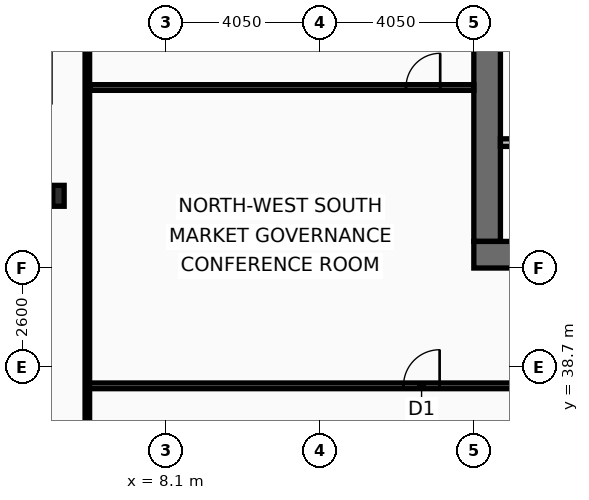
"""IFC4 building model, lengths in metres.
Left out: names, types, materials, properties, quantities, classifications, styles, units other than length and angle.
Written with IfcOpenShell. Run it as: python <this file> out.ifc"""

import sys

from ifc_helpers import new_model, si_unit, direction, frame, frame_2d, origin, origin_2d, place, context, subcontext, project, spatial, rectangle, i_section, extrude, element, fill, save


model = new_model("IFC4")
c1 = context("Model", 3, precision=1e-05, world=origin(), true_north=direction((0.0, 1.0)))
c2 = subcontext(c1, "Body", "Model", "MODEL_VIEW")
j1 = project(units=[si_unit("LENGTHUNIT", "METRE"), si_unit("PLANEANGLEUNIT", "RADIAN")], contexts=[c1])
p1 = place(None, origin())
s1 = spatial("IfcSite", under=j1, at=p1, CompositionType="ELEMENT")
p2 = place(p1, origin())
s2 = spatial("IfcBuilding", under=s1, at=p2, CompositionType="ELEMENT")
p3 = place(p2, frame((0.0, 0.0, 165.0)))
s3 = spatial("IfcBuildingStorey", under=s2, at=p3, CompositionType="ELEMENT", Elevation=165.0)
p4 = place(p3, frame((16.55, 42.0, 0.0), z_axis=(0.0, 0.0, 1.0), x_axis=(0.0, 1.0, 0.0)))
e1 = element("IfcWall", 1, at=p4, inside=s3, PredefinedType="SHEAR", context=c2, shape_type="SweptSolid", body=[
    extrude(rectangle(XDim=11.0, YDim=0.7, at=frame_2d((5.5, 0.0))), origin(), (0.0, 0.0, 1.0), 3.44),
])
p5 = place(p3, frame((18.65, 41.65, 0.0), z_axis=(0.0, 0.0, 1.0), x_axis=(-1.0, 0.0, 0.0)))
e2 = element("IfcWall", 2, at=p5, inside=s3, PredefinedType="SHEAR", context=c2, shape_type="SweptSolid", body=[
    extrude(rectangle(XDim=2.45, YDim=0.7, at=frame_2d((1.225, 0.0))), origin(), (0.0, 0.0, 1.0), 3.44),
])
p6 = place(p3, frame((5.27, 43.2, 0.0), z_axis=(0.0, 0.0, 1.0), x_axis=(1.0, 0.0, 0.0)))
e3 = element("IfcColumn", 3, at=p6, inside=s3, PredefinedType="COLUMN", context=c2, shape_type="SweptSolid", body=[
    extrude(i_section(OverallWidth=0.3, OverallDepth=0.55, WebThickness=0.015, FlangeThickness=0.029, at=origin_2d()), origin(), (0.0, 0.0, 1.0), 3.6),
])
p7 = place(p3, frame((16.9, 44.6, 0.0), z_axis=(0.0, 0.0, 1.0), x_axis=(1.0, 0.0, 0.0)))
e4 = element("IfcWall", 4, at=p7, inside=s3, PredefinedType="PARTITIONING", context=c2, shape_type="SweptSolid", body=[
    extrude(rectangle(XDim=4.1, YDim=0.2, at=frame_2d((2.05, 0.0))), origin(), (0.0, 0.0, 1.0), 3.44),
])
p8 = place(p7, frame((1.25, 0.0, 0.0)))
e5 = element("IfcOpeningElement", 5, at=p8, cuts=e4, PredefinedType="OPENING", context=c2, shape_type="SweptSolid", body=[
    extrude(rectangle(XDim=1.05, YDim=2.15, at=frame_2d((0.525, 1.075))), frame((0.0, 0.11, 0.0), z_axis=(0.0, -1.0, 0.0), x_axis=(1.0, 0.0, 0.0)), (0.0, 0.0, 1.0), 0.22),
])
p9 = place(p3, frame((6.03, 38.2, 0.0), z_axis=(0.0, 0.0, 1.0), x_axis=(1.0, 0.0, 0.0)))
e6 = element("IfcWall", 6, at=p9, inside=s3, PredefinedType="PARTITIONING", context=c2, shape_type="SweptSolid", body=[
    extrude(rectangle(XDim=12.52, YDim=0.15, at=frame_2d((6.26, 0.0))), origin(), (0.0, 0.0, 1.0), 2.73),
])
p10 = place(p9, frame((8.32, 0.0, 0.0)))
e7 = element("IfcOpeningElement", 7, at=p10, cuts=e6, PredefinedType="OPENING", context=c2, shape_type="SweptSolid", body=[
    extrude(rectangle(XDim=0.95, YDim=2.05, at=frame_2d((0.475, 1.025))), frame((0.0, 0.085, 0.0), z_axis=(0.0, -1.0, 0.0), x_axis=(1.0, 0.0, 0.0)), (0.0, 0.0, 1.0), 0.17),
])
p11 = place(p3, frame((6.095, 46.05, 0.0), z_axis=(0.0, 0.0, 1.0), x_axis=(1.0, 0.0, 0.0)))
e8 = element("IfcWall", 8, at=p11, inside=s3, PredefinedType="PARTITIONING", context=c2, shape_type="SweptSolid", body=[
    extrude(rectangle(XDim=10.105, YDim=0.15, at=frame_2d((5.052, 0.0))), origin(), (0.0, 0.0, 1.0), 2.83),
])
p12 = place(p11, frame((8.32, 0.0, 0.0)))
e9 = element("IfcOpeningElement", 9, at=p12, cuts=e8, PredefinedType="OPENING", context=c2, shape_type="SweptSolid", body=[
    extrude(rectangle(XDim=0.9, YDim=2.05, at=frame_2d((0.45, 1.025))), frame((0.0, 0.085, 0.0), z_axis=(0.0, -1.0, 0.0), x_axis=(1.0, 0.0, 0.0)), (0.0, 0.0, 1.0), 0.17),
])
p13 = place(p3, frame((6.03, 10.665, 0.0), z_axis=(0.0, 0.0, 1.0), x_axis=(0.0, 1.0, 0.0)))
e10 = element("IfcWall", 10, at=p13, inside=s3, PredefinedType="PARTITIONING", context=c2, shape_type="SweptSolid", body=[
    extrude(rectangle(XDim=42.11, YDim=0.12, at=frame_2d((21.055, 0.0))), origin(), (0.0, 0.0, 1.0), 2.73),
])
p14 = place(p10, origin())
e11 = element("IfcDoor", 11, at=p14, inside=s3, OperationType="SINGLE_SWING_RIGHT", PredefinedType="DOOR", context=c2, shape_type="SweptSolid", body=[
    extrude(rectangle(XDim=0.95, YDim=2.05, at=frame_2d((0.475, 1.025))), frame((0.0, 0.025, 0.0), z_axis=(0.0, -1.0, 0.0), x_axis=(1.0, 0.0, 0.0)), (0.0, 0.0, 1.0), 0.05),
])
fill(e7, e11)
p15 = place(p12, origin())
e12 = element("IfcDoor", 12, at=p15, inside=s3, OperationType="SINGLE_SWING_RIGHT", PredefinedType="DOOR", context=c2, shape_type="SweptSolid", body=[
    extrude(rectangle(XDim=0.9, YDim=2.05, at=frame_2d((0.45, 1.025))), frame((0.0, 0.025, 0.0), z_axis=(0.0, -1.0, 0.0), x_axis=(1.0, 0.0, 0.0)), (0.0, 0.0, 1.0), 0.05),
])
fill(e9, e12)
save(model, sys.argv[1])
